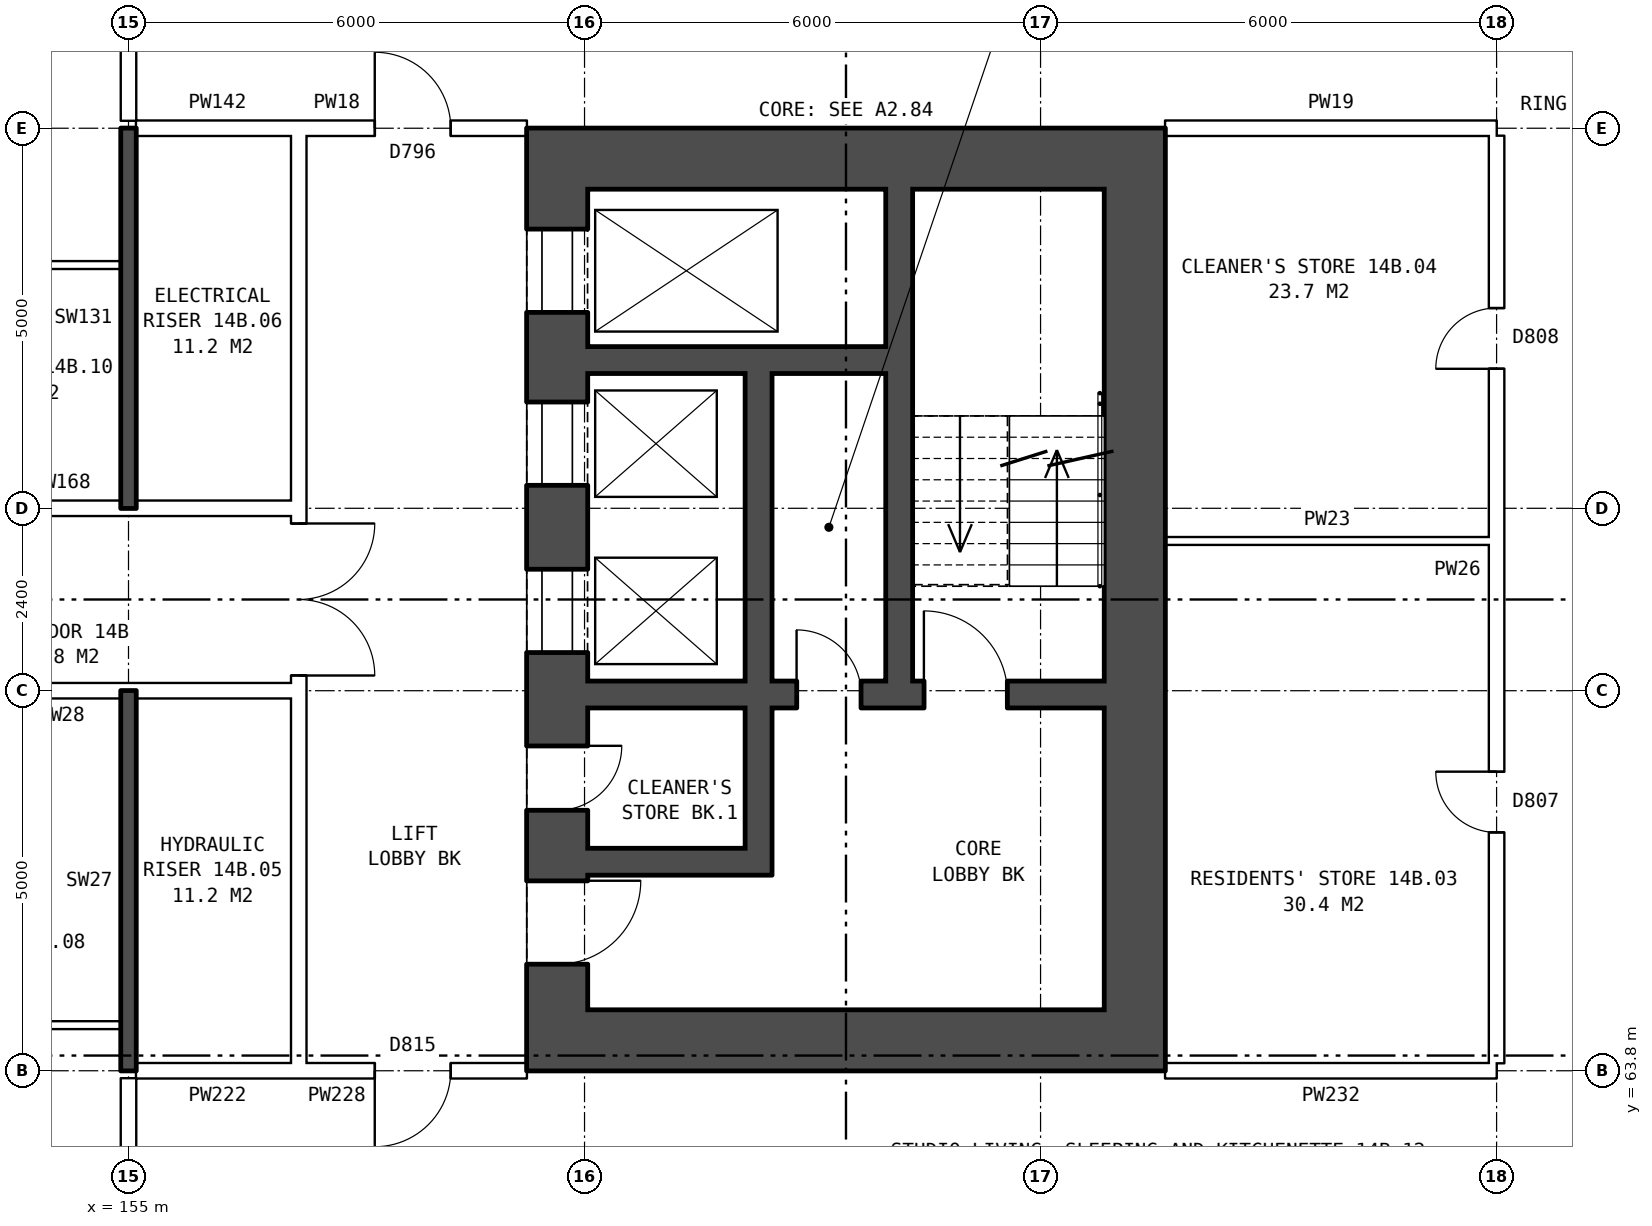
"""IFC4 building model, lengths in metres.
Left out: names, types, materials, properties, quantities, classifications, styles, units other than length and angle.
Written with IfcOpenShell. Run it as: python <this file> out.ifc"""

import sys

from ifc_helpers import new_model, si_unit, direction, frame, frame_2d, origin, place, context, subcontext, project, spatial, rectangle, extrude, element, fill, save


model = new_model("IFC4")
c1 = context("Model", 3, precision=1e-05, world=origin(), true_north=direction((0.0, 1.0)))
c2 = subcontext(c1, "Body", "Model", "MODEL_VIEW")
j1 = project(units=[si_unit("LENGTHUNIT", "METRE"), si_unit("PLANEANGLEUNIT", "RADIAN")], contexts=[c1])
p1 = place(None, origin())
s1 = spatial("IfcSite", under=j1, at=p1, CompositionType="ELEMENT")
p2 = place(p1, origin())
s2 = spatial("IfcBuilding", under=s1, at=p2, CompositionType="ELEMENT")
p3 = place(p2, frame((0.0, 0.0, 53.6)))
s3 = spatial("IfcBuildingStorey", under=s2, at=p3, CompositionType="ELEMENT", Elevation=53.6)
p4 = place(p3, frame((160.64, 75.4, 0.0), z_axis=(0.0, 0.0, 1.0), x_axis=(0.0, -1.0, 0.0)))
e1 = element("IfcWall", 1, at=p4, inside=s3, PredefinedType="SHEAR", context=c2, shape_type="SweptSolid", body=[
    extrude(rectangle(XDim=10.8, YDim=0.8, at=frame_2d((5.4, 0.0))), origin(), (0.0, 0.0, 1.0), 2.85),
])
p5 = place(p4, frame((0.525, 0.0, 0.0)))
e2 = element("IfcOpeningElement", 2, at=p5, cuts=e1, PredefinedType="OPENING", context=c2, shape_type="SweptSolid", body=[
    extrude(rectangle(XDim=1.1, YDim=2.1, at=frame_2d((0.55, 1.05))), frame((0.0, 0.41, 0.0), z_axis=(0.0, -1.0, 0.0), x_axis=(1.0, 0.0, 0.0)), (0.0, 0.0, 1.0), 0.82),
])
p6 = place(p4, frame((2.8, 0.0, 0.0)))
e3 = element("IfcOpeningElement", 3, at=p6, cuts=e1, PredefinedType="OPENING", context=c2, shape_type="SweptSolid", body=[
    extrude(rectangle(XDim=1.1, YDim=2.1, at=frame_2d((0.55, 1.05))), frame((0.0, 0.41, 0.0), z_axis=(0.0, -1.0, 0.0), x_axis=(1.0, 0.0, 0.0)), (0.0, 0.0, 1.0), 0.82),
])
p7 = place(p4, frame((5.0, 0.0, 0.0)))
e4 = element("IfcOpeningElement", 4, at=p7, cuts=e1, PredefinedType="OPENING", context=c2, shape_type="SweptSolid", body=[
    extrude(rectangle(XDim=1.1, YDim=2.1, at=frame_2d((0.55, 1.05))), frame((0.0, 0.41, 0.0), z_axis=(0.0, -1.0, 0.0), x_axis=(1.0, 0.0, 0.0)), (0.0, 0.0, 1.0), 0.82),
])
p8 = place(p4, frame((9.1, 0.0, 0.0)))
e5 = element("IfcOpeningElement", 5, at=p8, cuts=e1, PredefinedType="OPENING", context=c2, shape_type="SweptSolid", body=[
    extrude(rectangle(XDim=1.1, YDim=2.1, at=frame_2d((0.55, 1.05))), frame((0.0, 0.41, 0.0), z_axis=(0.0, -1.0, 0.0), x_axis=(1.0, 0.0, 0.0)), (0.0, 0.0, 1.0), 0.82),
])
p9 = place(p4, frame((7.325, 0.0, 0.0)))
e6 = element("IfcOpeningElement", 6, at=p9, cuts=e1, PredefinedType="OPENING", context=c2, shape_type="SweptSolid", body=[
    extrude(rectangle(XDim=0.85, YDim=2.1, at=frame_2d((0.425, 1.05))), frame((0.0, 0.41, 0.0), z_axis=(0.0, -1.0, 0.0), x_axis=(1.0, 0.0, 0.0)), (0.0, 0.0, 1.0), 0.82),
])
p10 = place(p3, frame((168.24, 75.4, 0.0), z_axis=(0.0, 0.0, 1.0), x_axis=(0.0, -1.0, 0.0)))
e7 = element("IfcWall", 7, at=p10, inside=s3, PredefinedType="SHEAR", context=c2, shape_type="SweptSolid", body=[
    extrude(rectangle(XDim=10.8, YDim=0.8, at=frame_2d((5.4, 0.0))), origin(), (0.0, 0.0, 1.0), 2.85),
])
for number, where, z_axis, x_axis in (
    (8, (160.24, 75.8, 0.0), (0.0, 0.0, 1.0), (1.0, 0.0, 0.0)),
    (9, (160.24, 64.2, 0.0), (0.0, 0.0, 1.0), (1.0, 0.0, 0.0)),
):
    element("IfcWall", number, at=place(p3, frame(where, z_axis=z_axis, x_axis=x_axis)), inside=s3, PredefinedType="SHEAR", context=c2, shape_type="SweptSolid", body=[
        extrude(rectangle(XDim=8.4, YDim=0.8, at=frame_2d((4.2, 0.0))), origin(), (0.0, 0.0, 1.0), 2.85),
    ])
p11 = place(p3, frame((161.04, 73.15, 0.0), z_axis=(0.0, 0.0, 1.0), x_axis=(1.0, 0.0, 0.0)))
e10 = element("IfcWall", 10, at=p11, inside=s3, PredefinedType="SHEAR", context=c2, shape_type="SweptSolid", body=[
    extrude(rectangle(XDim=3.925, YDim=0.35, at=frame_2d((1.962, 0.0))), origin(), (0.0, 0.0, 1.0), 2.85),
])
p12 = place(p3, frame((161.04, 68.75, 0.0), z_axis=(0.0, 0.0, 1.0), x_axis=(1.0, 0.0, 0.0)))
e11 = element("IfcWall", 11, at=p12, inside=s3, PredefinedType="SHEAR", context=c2, shape_type="SweptSolid", body=[
    extrude(rectangle(XDim=6.8, YDim=0.35, at=frame_2d((3.4, 0.0))), origin(), (0.0, 0.0, 1.0), 2.85),
])
p13 = place(p12, frame((4.425, 0.0, 0.0)))
e12 = element("IfcOpeningElement", 12, at=p13, cuts=e11, PredefinedType="OPENING", context=c2, shape_type="SweptSolid", body=[
    extrude(rectangle(XDim=1.1, YDim=2.1, at=frame_2d((0.55, 1.05))), frame((0.0, 0.185, 0.0), z_axis=(0.0, -1.0, 0.0), x_axis=(1.0, 0.0, 0.0)), (0.0, 0.0, 1.0), 0.37),
])
p14 = place(p12, frame((2.75, 0.0, 0.0)))
e13 = element("IfcOpeningElement", 13, at=p14, cuts=e11, PredefinedType="OPENING", context=c2, shape_type="SweptSolid", body=[
    extrude(rectangle(XDim=0.85, YDim=2.1, at=frame_2d((0.425, 1.05))), frame((0.0, 0.185, 0.0), z_axis=(0.0, -1.0, 0.0), x_axis=(1.0, 0.0, 0.0)), (0.0, 0.0, 1.0), 0.37),
])
p15 = place(p3, frame((161.04, 66.55, 0.0), z_axis=(0.0, 0.0, 1.0), x_axis=(1.0, 0.0, 0.0)))
e14 = element("IfcWall", 14, at=p15, inside=s3, PredefinedType="SHEAR", context=c2, shape_type="SweptSolid", body=[
    extrude(rectangle(XDim=2.075, YDim=0.35, at=frame_2d((1.038, 0.0))), origin(), (0.0, 0.0, 1.0), 2.85),
])
p16 = place(p3, frame((163.29, 72.975, 0.0), z_axis=(0.0, 0.0, 1.0), x_axis=(0.0, -1.0, 0.0)))
e15 = element("IfcWall", 15, at=p16, inside=s3, PredefinedType="SHEAR", context=c2, shape_type="SweptSolid", body=[
    extrude(rectangle(XDim=4.05, YDim=0.35, at=frame_2d((2.025, 0.0))), origin(), (0.0, 0.0, 1.0), 2.85),
])
p17 = place(p3, frame((163.29, 68.575, 0.0), z_axis=(0.0, 0.0, 1.0), x_axis=(0.0, -1.0, 0.0)))
e16 = element("IfcWall", 16, at=p17, inside=s3, PredefinedType="SHEAR", context=c2, shape_type="SweptSolid", body=[
    extrude(rectangle(XDim=2.2, YDim=0.35, at=frame_2d((1.1, 0.0))), origin(), (0.0, 0.0, 1.0), 2.85),
])
p18 = place(p3, frame((165.14, 75.4, 0.0), z_axis=(0.0, 0.0, 1.0), x_axis=(0.0, -1.0, 0.0)))
e17 = element("IfcWall", 17, at=p18, inside=s3, PredefinedType="SHEAR", context=c2, shape_type="SweptSolid", body=[
    extrude(rectangle(XDim=6.475, YDim=0.35, at=frame_2d((3.237, 0.0))), origin(), (0.0, 0.0, 1.0), 2.85),
])
p19 = place(p3, frame((157.24, 63.9, 0.0), z_axis=(0.0, 0.0, 1.0), x_axis=(0.0, 1.0, 0.0)))
e18 = element("IfcWall", 18, at=p19, inside=s3, PredefinedType="PARTITIONING", context=c2, shape_type="SweptSolid", body=[
    extrude(rectangle(XDim=12.2, YDim=0.2, at=frame_2d((6.1, 0.0))), origin(), (0.0, 0.0, 1.0), 2.85),
])
p20 = place(p19, frame((5.1, 0.0, 0.0)))
e19 = element("IfcOpeningElement", 19, at=p20, cuts=e18, PredefinedType="OPENING", context=c2, shape_type="SweptSolid", body=[
    extrude(rectangle(XDim=2.0, YDim=2.1, at=frame_2d((1.0, 1.05))), frame((0.0, 0.11, 0.0), z_axis=(0.0, -1.0, 0.0), x_axis=(1.0, 0.0, 0.0)), (0.0, 0.0, 1.0), 0.22),
])
p21 = place(p3, frame((155.1, 63.8, 0.0), z_axis=(0.0, 0.0, 1.0), x_axis=(1.0, 0.0, 0.0)))
e20 = element("IfcWall", 20, at=p21, inside=s3, PredefinedType="PARTITIONING", context=c2, shape_type="SweptSolid", body=[
    extrude(rectangle(XDim=2.14, YDim=0.2, at=frame_2d((1.07, 0.0))), origin(), (0.0, 0.0, 1.0), 2.85),
])
p22 = place(p3, frame((157.24, 63.8, 0.0), z_axis=(0.0, 0.0, 1.0), x_axis=(1.0, 0.0, 0.0)))
e21 = element("IfcWall", 21, at=p22, inside=s3, PredefinedType="PARTITIONING", context=c2, shape_type="SweptSolid", body=[
    extrude(rectangle(XDim=3.0, YDim=0.2, at=frame_2d((1.5, 0.0))), origin(), (0.0, 0.0, 1.0), 2.85),
])
p23 = place(p22, frame((1.0, 0.0, 0.0)))
e22 = element("IfcOpeningElement", 22, at=p23, cuts=e21, PredefinedType="OPENING", context=c2, shape_type="SweptSolid", body=[
    extrude(rectangle(XDim=1.0, YDim=2.1, at=frame_2d((0.5, 1.05))), frame((0.0, 0.11, 0.0), z_axis=(0.0, -1.0, 0.0), x_axis=(1.0, 0.0, 0.0)), (0.0, 0.0, 1.0), 0.22),
])
p24 = place(p3, frame((168.64, 63.8, 0.0), z_axis=(0.0, 0.0, 1.0), x_axis=(1.0, 0.0, 0.0)))
e23 = element("IfcWall", 23, at=p24, inside=s3, PredefinedType="PARTITIONING", context=c2, shape_type="SweptSolid", body=[
    extrude(rectangle(XDim=4.36, YDim=0.2, at=frame_2d((2.18, 0.0))), origin(), (0.0, 0.0, 1.0), 2.85),
])
p25 = place(p3, frame((152.0, 64.4, 0.0), z_axis=(0.0, 0.0, 1.0), x_axis=(1.0, 0.0, 0.0)))
e24 = element("IfcWall", 24, at=p25, inside=s3, PredefinedType="PARTITIONING", context=c2, shape_type="SweptSolid", body=[
    extrude(rectangle(XDim=2.9, YDim=0.1, at=frame_2d((1.45, 0.0))), origin(), (0.0, 0.0, 1.0), 2.85),
])
p26 = place(p3, frame((142.76, 68.8, 0.0), z_axis=(0.0, 0.0, 1.0), x_axis=(1.0, 0.0, 0.0)))
e25 = element("IfcWall", 25, at=p26, inside=s3, PredefinedType="PARTITIONING", context=c2, shape_type="SweptSolid", body=[
    extrude(rectangle(XDim=14.48, YDim=0.2, at=frame_2d((7.24, 0.0))), origin(), (0.0, 0.0, 1.0), 2.85),
])
p27 = place(p26, frame((4.24, 0.0, 0.0)))
e26 = element("IfcOpeningElement", 26, at=p27, cuts=e25, PredefinedType="OPENING", context=c2, shape_type="SweptSolid", body=[
    extrude(rectangle(XDim=1.0, YDim=2.1, at=frame_2d((0.5, 1.05))), frame((0.0, 0.11, 0.0), z_axis=(0.0, -1.0, 0.0), x_axis=(1.0, 0.0, 0.0)), (0.0, 0.0, 1.0), 0.22),
])
p28 = place(p26, frame((7.24, 0.0, 0.0)))
e27 = element("IfcOpeningElement", 27, at=p28, cuts=e25, PredefinedType="OPENING", context=c2, shape_type="SweptSolid", body=[
    extrude(rectangle(XDim=1.0, YDim=2.1, at=frame_2d((0.5, 1.05))), frame((0.0, 0.11, 0.0), z_axis=(0.0, -1.0, 0.0), x_axis=(1.0, 0.0, 0.0)), (0.0, 0.0, 1.0), 0.22),
])
p29 = place(p3, frame((168.64, 70.77, 0.0), z_axis=(0.0, 0.0, 1.0), x_axis=(1.0, 0.0, 0.0)))
e28 = element("IfcWall", 28, at=p29, inside=s3, PredefinedType="PARTITIONING", context=c2, shape_type="SweptSolid", body=[
    extrude(rectangle(XDim=4.26, YDim=0.1, at=frame_2d((2.13, 0.0))), origin(), (0.0, 0.0, 1.0), 2.85),
])
p30 = place(p3, frame((142.76, 71.2, 0.0), z_axis=(0.0, 0.0, 1.0), x_axis=(1.0, 0.0, 0.0)))
e29 = element("IfcWall", 29, at=p30, inside=s3, PredefinedType="PARTITIONING", context=c2, shape_type="SweptSolid", body=[
    extrude(rectangle(XDim=14.48, YDim=0.2, at=frame_2d((7.24, 0.0))), origin(), (0.0, 0.0, 1.0), 2.85),
])
p31 = place(p30, frame((4.24, 0.0, 0.0)))
e30 = element("IfcOpeningElement", 30, at=p31, cuts=e29, PredefinedType="OPENING", context=c2, shape_type="SweptSolid", body=[
    extrude(rectangle(XDim=1.0, YDim=2.1, at=frame_2d((0.5, 1.05))), frame((0.0, 0.11, 0.0), z_axis=(0.0, -1.0, 0.0), x_axis=(1.0, 0.0, 0.0)), (0.0, 0.0, 1.0), 0.22),
])
p32 = place(p30, frame((7.24, 0.0, 0.0)))
e31 = element("IfcOpeningElement", 31, at=p32, cuts=e29, PredefinedType="OPENING", context=c2, shape_type="SweptSolid", body=[
    extrude(rectangle(XDim=1.0, YDim=2.1, at=frame_2d((0.5, 1.05))), frame((0.0, 0.11, 0.0), z_axis=(0.0, -1.0, 0.0), x_axis=(1.0, 0.0, 0.0)), (0.0, 0.0, 1.0), 0.22),
])
p33 = place(p3, frame((152.0, 74.4, 0.0), z_axis=(0.0, 0.0, 1.0), x_axis=(1.0, 0.0, 0.0)))
e32 = element("IfcWall", 32, at=p33, inside=s3, PredefinedType="PARTITIONING", context=c2, shape_type="SweptSolid", body=[
    extrude(rectangle(XDim=2.9, YDim=0.1, at=frame_2d((1.45, 0.0))), origin(), (0.0, 0.0, 1.0), 2.85),
])
p34 = place(p3, frame((155.1, 76.2, 0.0), z_axis=(0.0, 0.0, 1.0), x_axis=(1.0, 0.0, 0.0)))
e33 = element("IfcWall", 33, at=p34, inside=s3, PredefinedType="PARTITIONING", context=c2, shape_type="SweptSolid", body=[
    extrude(rectangle(XDim=2.14, YDim=0.2, at=frame_2d((1.07, 0.0))), origin(), (0.0, 0.0, 1.0), 2.85),
])
p35 = place(p3, frame((157.24, 76.2, 0.0), z_axis=(0.0, 0.0, 1.0), x_axis=(1.0, 0.0, 0.0)))
e34 = element("IfcWall", 34, at=p35, inside=s3, PredefinedType="PARTITIONING", context=c2, shape_type="SweptSolid", body=[
    extrude(rectangle(XDim=3.0, YDim=0.2, at=frame_2d((1.5, 0.0))), origin(), (0.0, 0.0, 1.0), 2.85),
])
p36 = place(p35, frame((1.0, 0.0, 0.0)))
e35 = element("IfcOpeningElement", 35, at=p36, cuts=e34, PredefinedType="OPENING", context=c2, shape_type="SweptSolid", body=[
    extrude(rectangle(XDim=1.0, YDim=2.1, at=frame_2d((0.5, 1.05))), frame((0.0, 0.11, 0.0), z_axis=(0.0, -1.0, 0.0), x_axis=(1.0, 0.0, 0.0)), (0.0, 0.0, 1.0), 0.22),
])
p37 = place(p3, frame((168.64, 76.2, 0.0), z_axis=(0.0, 0.0, 1.0), x_axis=(1.0, 0.0, 0.0)))
e36 = element("IfcWall", 36, at=p37, inside=s3, PredefinedType="PARTITIONING", context=c2, shape_type="SweptSolid", body=[
    extrude(rectangle(XDim=4.36, YDim=0.2, at=frame_2d((2.18, 0.0))), origin(), (0.0, 0.0, 1.0), 2.85),
])
p38 = place(p3, frame((155.0, 61.5, 0.0), z_axis=(0.0, 0.0, 1.0), x_axis=(0.0, 1.0, 0.0)))
e37 = element("IfcWall", 37, at=p38, inside=s3, PredefinedType="PARTITIONING", context=c2, shape_type="SweptSolid", body=[
    extrude(rectangle(XDim=2.2, YDim=0.2, at=frame_2d((1.1, 0.0))), origin(), (0.0, 0.0, 1.0), 2.85),
])
for number, where, z_axis, x_axis in (
    (38, (155.0, 63.8, 0.0), (0.0, 0.0, 1.0), (0.0, 1.0, 0.0)),
    (39, (155.0, 71.2, 0.0), (0.0, 0.0, 1.0), (0.0, 1.0, 0.0)),
):
    element("IfcWall", number, at=place(p3, frame(where, z_axis=z_axis, x_axis=x_axis)), inside=s3, PredefinedType="SOLIDWALL", context=c2, shape_type="SweptSolid", body=[
        extrude(rectangle(XDim=5.0, YDim=0.2, at=frame_2d((2.5, 0.0))), origin(), (0.0, 0.0, 1.0), 2.85),
    ])
p39 = place(p3, frame((155.0, 76.3, 0.0), z_axis=(0.0, 0.0, 1.0), x_axis=(0.0, 1.0, 0.0)))
e40 = element("IfcWall", 40, at=p39, inside=s3, PredefinedType="PARTITIONING", context=c2, shape_type="SweptSolid", body=[
    extrude(rectangle(XDim=2.2, YDim=0.2, at=frame_2d((1.1, 0.0))), origin(), (0.0, 0.0, 1.0), 2.85),
])
p40 = place(p3, frame((173.0, 63.9, 0.0), z_axis=(0.0, 0.0, 1.0), x_axis=(0.0, 1.0, 0.0)))
e41 = element("IfcWall", 41, at=p40, inside=s3, PredefinedType="PARTITIONING", context=c2, shape_type="SweptSolid", body=[
    extrude(rectangle(XDim=12.2, YDim=0.2, at=frame_2d((6.1, 0.0))), origin(), (0.0, 0.0, 1.0), 2.85),
])
p41 = place(p40, frame((3.035, 0.0, 0.0)))
e42 = element("IfcOpeningElement", 42, at=p41, cuts=e41, PredefinedType="OPENING", context=c2, shape_type="SweptSolid", body=[
    extrude(rectangle(XDim=0.8, YDim=2.1, at=frame_2d((0.4, 1.05))), frame((0.0, 0.11, 0.0), z_axis=(0.0, -1.0, 0.0), x_axis=(1.0, 0.0, 0.0)), (0.0, 0.0, 1.0), 0.22),
])
p42 = place(p40, frame((9.135, 0.0, 0.0)))
e43 = element("IfcOpeningElement", 43, at=p42, cuts=e41, PredefinedType="OPENING", context=c2, shape_type="SweptSolid", body=[
    extrude(rectangle(XDim=0.8, YDim=2.1, at=frame_2d((0.4, 1.05))), frame((0.0, 0.11, 0.0), z_axis=(0.0, -1.0, 0.0), x_axis=(1.0, 0.0, 0.0)), (0.0, 0.0, 1.0), 0.22),
])
p43 = place(p5, origin())
e44 = element("IfcDoor", 44, at=p43, inside=s3, OperationType="DOUBLE_DOOR_SLIDING", PredefinedType="DOOR", context=c2, shape_type="SweptSolid", body=[
    extrude(rectangle(XDim=1.1, YDim=2.1, at=frame_2d((0.55, 1.05))), frame((0.0, 0.385, 0.0), z_axis=(0.0, -1.0, 0.0), x_axis=(1.0, 0.0, 0.0)), (0.0, 0.0, 1.0), 0.05),
])
fill(e2, e44)
p44 = place(p6, origin())
e45 = element("IfcDoor", 45, at=p44, inside=s3, OperationType="DOUBLE_DOOR_SLIDING", PredefinedType="DOOR", context=c2, shape_type="SweptSolid", body=[
    extrude(rectangle(XDim=1.1, YDim=2.1, at=frame_2d((0.55, 1.05))), frame((0.0, 0.385, 0.0), z_axis=(0.0, -1.0, 0.0), x_axis=(1.0, 0.0, 0.0)), (0.0, 0.0, 1.0), 0.05),
])
fill(e3, e45)
p45 = place(p7, origin())
e46 = element("IfcDoor", 46, at=p45, inside=s3, OperationType="DOUBLE_DOOR_SLIDING", PredefinedType="DOOR", context=c2, shape_type="SweptSolid", body=[
    extrude(rectangle(XDim=1.1, YDim=2.1, at=frame_2d((0.55, 1.05))), frame((0.0, 0.385, 0.0), z_axis=(0.0, -1.0, 0.0), x_axis=(1.0, 0.0, 0.0)), (0.0, 0.0, 1.0), 0.05),
])
fill(e4, e46)
p46 = place(p8, origin())
e47 = element("IfcDoor", 47, at=p46, inside=s3, OperationType="SINGLE_SWING_LEFT", PredefinedType="DOOR", context=c2, shape_type="SweptSolid", body=[
    extrude(rectangle(XDim=1.1, YDim=2.1, at=frame_2d((0.55, 1.05))), frame((0.0, 0.385, 0.0), z_axis=(0.0, -1.0, 0.0), x_axis=(1.0, 0.0, 0.0)), (0.0, 0.0, 1.0), 0.05),
])
fill(e5, e47)
p47 = place(p13, origin())
e48 = element("IfcDoor", 48, at=p47, inside=s3, OperationType="SINGLE_SWING_LEFT", PredefinedType="DOOR", context=c2, shape_type="SweptSolid", body=[
    extrude(rectangle(XDim=1.1, YDim=2.1, at=frame_2d((0.55, 1.05))), frame((0.0, 0.025, 0.0), z_axis=(0.0, -1.0, 0.0), x_axis=(1.0, 0.0, 0.0)), (0.0, 0.0, 1.0), 0.05),
])
fill(e12, e48)
p48 = place(p9, origin())
e49 = element("IfcDoor", 49, at=p48, inside=s3, OperationType="SINGLE_SWING_LEFT", PredefinedType="DOOR", context=c2, shape_type="SweptSolid", body=[
    extrude(rectangle(XDim=0.85, YDim=2.1, at=frame_2d((0.425, 1.05))), frame((0.0, 0.385, 0.0), z_axis=(0.0, -1.0, 0.0), x_axis=(1.0, 0.0, 0.0)), (0.0, 0.0, 1.0), 0.05),
])
fill(e6, e49)
p49 = place(p14, origin())
e50 = element("IfcDoor", 50, at=p49, inside=s3, OperationType="SINGLE_SWING_LEFT", PredefinedType="DOOR", context=c2, shape_type="SweptSolid", body=[
    extrude(rectangle(XDim=0.85, YDim=2.1, at=frame_2d((0.425, 1.05))), frame((0.0, 0.025, 0.0), z_axis=(0.0, -1.0, 0.0), x_axis=(1.0, 0.0, 0.0)), (0.0, 0.0, 1.0), 0.05),
])
fill(e13, e50)
p50 = place(p20, frame((2.0, 0.0, 0.0), z_axis=(0.0, 0.0, 1.0), x_axis=(-1.0, 0.0, 0.0)))
e51 = element("IfcDoor", 51, at=p50, inside=s3, OperationType="DOUBLE_DOOR_SINGLE_SWING", PredefinedType="DOOR", context=c2, shape_type="SweptSolid", body=[
    extrude(rectangle(XDim=2.0, YDim=2.1, at=frame_2d((1.0, 1.05))), frame((0.0, 0.025, 0.0), z_axis=(0.0, -1.0, 0.0), x_axis=(1.0, 0.0, 0.0)), (0.0, 0.0, 1.0), 0.05),
])
fill(e19, e51)
p51 = place(p23, frame((1.0, 0.0, 0.0), z_axis=(0.0, 0.0, 1.0), x_axis=(-1.0, 0.0, 0.0)))
e52 = element("IfcDoor", 52, at=p51, inside=s3, OperationType="SINGLE_SWING_RIGHT", PredefinedType="DOOR", context=c2, shape_type="SweptSolid", body=[
    extrude(rectangle(XDim=1.0, YDim=2.1, at=frame_2d((0.5, 1.05))), frame((0.0, 0.025, 0.0), z_axis=(0.0, -1.0, 0.0), x_axis=(1.0, 0.0, 0.0)), (0.0, 0.0, 1.0), 0.05),
])
fill(e22, e52)
p52 = place(p36, origin())
e53 = element("IfcDoor", 53, at=p52, inside=s3, OperationType="SINGLE_SWING_LEFT", PredefinedType="DOOR", context=c2, shape_type="SweptSolid", body=[
    extrude(rectangle(XDim=1.0, YDim=2.1, at=frame_2d((0.5, 1.05))), frame((0.0, 0.025, 0.0), z_axis=(0.0, -1.0, 0.0), x_axis=(1.0, 0.0, 0.0)), (0.0, 0.0, 1.0), 0.05),
])
fill(e35, e53)
p53 = place(p41, origin())
e54 = element("IfcDoor", 54, at=p53, inside=s3, OperationType="SINGLE_SWING_RIGHT", PredefinedType="DOOR", context=c2, shape_type="SweptSolid", body=[
    extrude(rectangle(XDim=0.8, YDim=2.1, at=frame_2d((0.4, 1.05))), frame((0.0, 0.025, 0.0), z_axis=(0.0, -1.0, 0.0), x_axis=(1.0, 0.0, 0.0)), (0.0, 0.0, 1.0), 0.05),
])
fill(e42, e54)
p54 = place(p42, origin())
e55 = element("IfcDoor", 55, at=p54, inside=s3, OperationType="SINGLE_SWING_LEFT", PredefinedType="DOOR", context=c2, shape_type="SweptSolid", body=[
    extrude(rectangle(XDim=0.8, YDim=2.1, at=frame_2d((0.4, 1.05))), frame((0.0, 0.025, 0.0), z_axis=(0.0, -1.0, 0.0), x_axis=(1.0, 0.0, 0.0)), (0.0, 0.0, 1.0), 0.05),
])
fill(e43, e55)
save(model, sys.argv[1])
